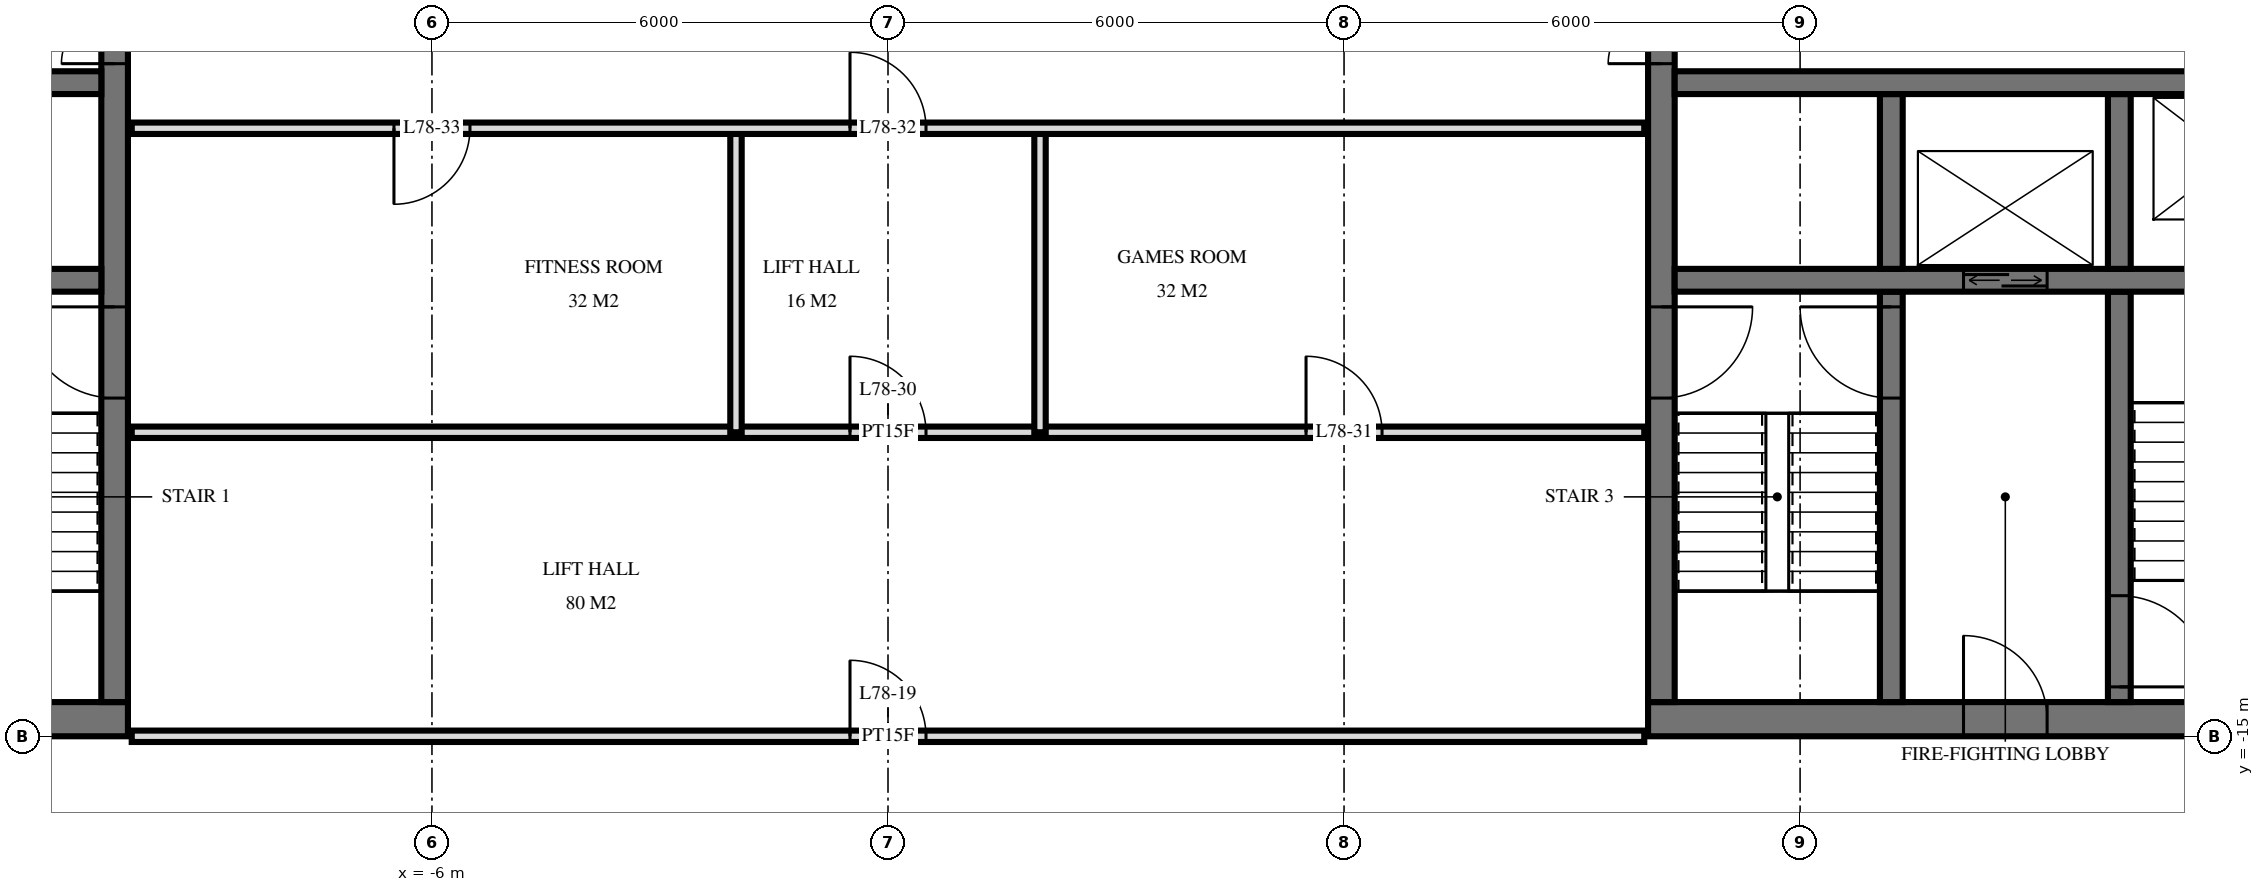
"""IFC4 building model, lengths in metres.
Left out: names, types, materials, properties, quantities, classifications, styles, units other than length and angle.
Written with IfcOpenShell. Run it as: python <this file> out.ifc"""

import sys

from ifc_helpers import new_model, si_unit, direction, frame, frame_2d, origin, place, context, subcontext, project, spatial, rectangle, extrude, element, fill, save


model = new_model("IFC4")
c1 = context("Model", 3, precision=1e-05, world=origin(), true_north=direction((0.0, 1.0)))
c2 = subcontext(c1, "Body", "Model", "MODEL_VIEW")
j1 = project(units=[si_unit("LENGTHUNIT", "METRE"), si_unit("PLANEANGLEUNIT", "RADIAN")], contexts=[c1])
p1 = place(None, origin())
s1 = spatial("IfcSite", under=j1, at=p1, CompositionType="ELEMENT")
p2 = place(p1, origin())
s2 = spatial("IfcBuilding", under=s1, at=p2, CompositionType="ELEMENT")
p3 = place(p2, frame((0.0, 0.0, 294.6)))
s3 = spatial("IfcBuildingStorey", under=s2, at=p3, CompositionType="ELEMENT", Elevation=294.6)
p4 = place(p3, frame((-19.5, -14.775, 0.0), z_axis=(0.0, 0.0, 1.0), x_axis=(1.0, 0.0, 0.0)))
e1 = element("IfcWall", 1, at=p4, inside=s3, PredefinedType="SHEAR", context=c2, shape_type="SweptSolid", body=[
    extrude(rectangle(XDim=9.5, YDim=0.45, at=frame_2d((4.75, 0.0))), origin(), (0.0, 0.0, 1.0), 3.5),
])
p5 = place(p4, frame((1.2, 0.0, 0.0)))
e2 = element("IfcOpeningElement", 2, at=p5, cuts=e1, PredefinedType="OPENING", context=c2, shape_type="SweptSolid", body=[
    extrude(rectangle(XDim=1.2, YDim=2.1, at=frame_2d((0.6, 1.05))), frame((0.0, 0.235, 0.0), z_axis=(0.0, -1.0, 0.0), x_axis=(1.0, 0.0, 0.0)), (0.0, 0.0, 1.0), 0.47),
])
p6 = place(p4, frame((4.25, 0.0, 0.0)))
e3 = element("IfcOpeningElement", 3, at=p6, cuts=e1, PredefinedType="OPENING", context=c2, shape_type="SweptSolid", body=[
    extrude(rectangle(XDim=1.1, YDim=2.1, at=frame_2d((0.55, 1.05))), frame((0.0, 0.235, 0.0), z_axis=(0.0, -1.0, 0.0), x_axis=(1.0, 0.0, 0.0)), (0.0, 0.0, 1.0), 0.47),
])
p7 = place(p3, frame((-10.175, -14.55, 0.0), z_axis=(0.0, 0.0, 1.0), x_axis=(0.0, 1.0, 0.0)))
e4 = element("IfcWall", 4, at=p7, inside=s3, PredefinedType="SHEAR", context=c2, shape_type="SweptSolid", body=[
    extrude(rectangle(XDim=14.1, YDim=0.35, at=frame_2d((7.05, 0.0))), origin(), (0.0, 0.0, 1.0), 3.5),
])
p8 = place(p7, frame((8.4, 0.0, 0.0)))
e5 = element("IfcOpeningElement", 5, at=p8, cuts=e4, PredefinedType="OPENING", context=c2, shape_type="SweptSolid", body=[
    extrude(rectangle(XDim=1.4, YDim=2.4, at=frame_2d((0.7, 1.2))), frame((0.0, 0.185, 0.0), z_axis=(0.0, -1.0, 0.0), x_axis=(1.0, 0.0, 0.0)), (0.0, 0.0, 1.0), 0.37),
])
p9 = place(p7, frame((10.0, 0.0, 0.0)))
e6 = element("IfcOpeningElement", 6, at=p9, cuts=e4, PredefinedType="OPENING", context=c2, shape_type="SweptSolid", body=[
    extrude(rectangle(XDim=1.4, YDim=2.4, at=frame_2d((0.7, 1.2))), frame((0.0, 0.185, 0.0), z_axis=(0.0, -1.0, 0.0), x_axis=(1.0, 0.0, 0.0)), (0.0, 0.0, 1.0), 0.37),
])
p10 = place(p7, frame((4.0, 0.0, 0.0)))
e7 = element("IfcOpeningElement", 7, at=p10, cuts=e4, PredefinedType="OPENING", context=c2, shape_type="SweptSolid", body=[
    extrude(rectangle(XDim=1.2, YDim=2.1, at=frame_2d((0.6, 1.05))), frame((0.0, 0.185, 0.0), z_axis=(0.0, -1.0, 0.0), x_axis=(1.0, 0.0, 0.0)), (0.0, 0.0, 1.0), 0.37),
])
p11 = place(p3, frame((-19.05, -6.4, 0.0), z_axis=(0.0, 0.0, 1.0), x_axis=(1.0, 0.0, 0.0)))
e8 = element("IfcWall", 8, at=p11, inside=s3, PredefinedType="SHEAR", context=c2, shape_type="SweptSolid", body=[
    extrude(rectangle(XDim=8.7, YDim=0.3, at=frame_2d((4.35, 0.0))), origin(), (0.0, 0.0, 1.0), 3.5),
])
p12 = place(p11, frame((0.8, 0.0, 0.0)))
e9 = element("IfcOpeningElement", 9, at=p12, cuts=e8, PredefinedType="OPENING", context=c2, shape_type="SweptSolid", body=[
    extrude(rectangle(XDim=1.1, YDim=2.1, at=frame_2d((0.55, 1.05))), frame((0.0, 0.16, 0.0), z_axis=(0.0, -1.0, 0.0), x_axis=(1.0, 0.0, 0.0)), (0.0, 0.0, 1.0), 0.32),
])
p13 = place(p3, frame((-19.05, -9.0, 0.0), z_axis=(0.0, 0.0, 1.0), x_axis=(1.0, 0.0, 0.0)))
e10 = element("IfcWall", 10, at=p13, inside=s3, PredefinedType="SHEAR", context=c2, shape_type="SweptSolid", body=[
    extrude(rectangle(XDim=8.7, YDim=0.3, at=frame_2d((4.35, 0.0))), origin(), (0.0, 0.0, 1.0), 3.5),
])
p14 = place(p13, frame((3.8, 0.0, 0.0)))
e11 = element("IfcOpeningElement", 11, at=p14, cuts=e10, PredefinedType="OPENING", context=c2, shape_type="SweptSolid", body=[
    extrude(rectangle(XDim=1.1, YDim=2.1, at=frame_2d((0.55, 1.05))), frame((0.0, 0.16, 0.0), z_axis=(0.0, -1.0, 0.0), x_axis=(1.0, 0.0, 0.0)), (0.0, 0.0, 1.0), 0.32),
])
p15 = place(p3, frame((10.0, -14.775, 0.0), z_axis=(0.0, 0.0, 1.0), x_axis=(1.0, 0.0, 0.0)))
e12 = element("IfcWall", 12, at=p15, inside=s3, PredefinedType="SHEAR", context=c2, shape_type="SweptSolid", body=[
    extrude(rectangle(XDim=9.5, YDim=0.45, at=frame_2d((4.75, 0.0))), origin(), (0.0, 0.0, 1.0), 3.5),
])
p16 = place(p15, frame((7.1, 0.0, 0.0)))
e13 = element("IfcOpeningElement", 13, at=p16, cuts=e12, PredefinedType="OPENING", context=c2, shape_type="SweptSolid", body=[
    extrude(rectangle(XDim=1.2, YDim=2.1, at=frame_2d((0.6, 1.05))), frame((0.0, 0.235, 0.0), z_axis=(0.0, -1.0, 0.0), x_axis=(1.0, 0.0, 0.0)), (0.0, 0.0, 1.0), 0.47),
])
p17 = place(p15, frame((4.15, 0.0, 0.0)))
e14 = element("IfcOpeningElement", 14, at=p17, cuts=e12, PredefinedType="OPENING", context=c2, shape_type="SweptSolid", body=[
    extrude(rectangle(XDim=1.1, YDim=2.1, at=frame_2d((0.55, 1.05))), frame((0.0, 0.235, 0.0), z_axis=(0.0, -1.0, 0.0), x_axis=(1.0, 0.0, 0.0)), (0.0, 0.0, 1.0), 0.47),
])
p18 = place(p3, frame((10.175, -14.55, 0.0), z_axis=(0.0, 0.0, 1.0), x_axis=(0.0, 1.0, 0.0)))
e15 = element("IfcWall", 15, at=p18, inside=s3, PredefinedType="SHEAR", context=c2, shape_type="SweptSolid", body=[
    extrude(rectangle(XDim=14.1, YDim=0.35, at=frame_2d((7.05, 0.0))), origin(), (0.0, 0.0, 1.0), 3.5),
])
p19 = place(p18, frame((8.4, 0.0, 0.0)))
e16 = element("IfcOpeningElement", 16, at=p19, cuts=e15, PredefinedType="OPENING", context=c2, shape_type="SweptSolid", body=[
    extrude(rectangle(XDim=1.4, YDim=2.4, at=frame_2d((0.7, 1.2))), frame((0.0, 0.185, 0.0), z_axis=(0.0, -1.0, 0.0), x_axis=(1.0, 0.0, 0.0)), (0.0, 0.0, 1.0), 0.37),
])
p20 = place(p18, frame((10.0, 0.0, 0.0)))
e17 = element("IfcOpeningElement", 17, at=p20, cuts=e15, PredefinedType="OPENING", context=c2, shape_type="SweptSolid", body=[
    extrude(rectangle(XDim=1.4, YDim=2.4, at=frame_2d((0.7, 1.2))), frame((0.0, 0.185, 0.0), z_axis=(0.0, -1.0, 0.0), x_axis=(1.0, 0.0, 0.0)), (0.0, 0.0, 1.0), 0.37),
])
p21 = place(p18, frame((4.0, 0.0, 0.0)))
e18 = element("IfcOpeningElement", 18, at=p21, cuts=e15, PredefinedType="OPENING", context=c2, shape_type="SweptSolid", body=[
    extrude(rectangle(XDim=1.2, YDim=2.1, at=frame_2d((0.6, 1.05))), frame((0.0, 0.185, 0.0), z_axis=(0.0, -1.0, 0.0), x_axis=(1.0, 0.0, 0.0)), (0.0, 0.0, 1.0), 0.37),
])
p22 = place(p3, frame((10.35, -6.4, 0.0), z_axis=(0.0, 0.0, 1.0), x_axis=(1.0, 0.0, 0.0)))
e19 = element("IfcWall", 19, at=p22, inside=s3, PredefinedType="SHEAR", context=c2, shape_type="SweptSolid", body=[
    extrude(rectangle(XDim=8.7, YDim=0.3, at=frame_2d((4.35, 0.0))), origin(), (0.0, 0.0, 1.0), 3.5),
])
p23 = place(p22, frame((6.8, 0.0, 0.0)))
e20 = element("IfcOpeningElement", 20, at=p23, cuts=e19, PredefinedType="OPENING", context=c2, shape_type="SweptSolid", body=[
    extrude(rectangle(XDim=1.1, YDim=2.1, at=frame_2d((0.55, 1.05))), frame((0.0, 0.16, 0.0), z_axis=(0.0, -1.0, 0.0), x_axis=(1.0, 0.0, 0.0)), (0.0, 0.0, 1.0), 0.32),
])
p24 = place(p3, frame((10.35, -9.0, 0.0), z_axis=(0.0, 0.0, 1.0), x_axis=(1.0, 0.0, 0.0)))
e21 = element("IfcWall", 21, at=p24, inside=s3, PredefinedType="SHEAR", context=c2, shape_type="SweptSolid", body=[
    extrude(rectangle(XDim=8.7, YDim=0.3, at=frame_2d((4.35, 0.0))), origin(), (0.0, 0.0, 1.0), 3.5),
])
p25 = place(p24, frame((3.8, 0.0, 0.0)))
e22 = element("IfcOpeningElement", 22, at=p25, cuts=e21, PredefinedType="OPENING", context=c2, shape_type="SweptSolid", body=[
    extrude(rectangle(XDim=1.1, YDim=2.1, at=frame_2d((0.55, 1.05))), frame((0.0, 0.16, 0.0), z_axis=(0.0, -1.0, 0.0), x_axis=(1.0, 0.0, 0.0)), (0.0, 0.0, 1.0), 0.32),
])
p26 = place(p3, frame((13.2, -8.85, 0.0), z_axis=(0.0, 0.0, 1.0), x_axis=(0.0, 1.0, 0.0)))
e23 = element("IfcWall", 23, at=p26, inside=s3, PredefinedType="SHEAR", context=c2, shape_type="SweptSolid", body=[
    extrude(rectangle(XDim=2.3, YDim=0.3, at=frame_2d((1.15, 0.0))), origin(), (0.0, 0.0, 1.0), 3.5),
])
p27 = place(p3, frame((13.2, -14.55, 0.0), z_axis=(0.0, 0.0, 1.0), x_axis=(0.0, 1.0, 0.0)))
e24 = element("IfcWall", 24, at=p27, inside=s3, PredefinedType="SHEAR", context=c2, shape_type="SweptSolid", body=[
    extrude(rectangle(XDim=5.4, YDim=0.3, at=frame_2d((2.7, 0.0))), origin(), (0.0, 0.0, 1.0), 3.5),
])
p28 = place(p27, frame((4.0, 0.0, 0.0)))
e25 = element("IfcOpeningElement", 25, at=p28, cuts=e24, PredefinedType="OPENING", context=c2, shape_type="SweptSolid", body=[
    extrude(rectangle(XDim=1.2, YDim=2.1, at=frame_2d((0.6, 1.05))), frame((0.0, 0.16, 0.0), z_axis=(0.0, -1.0, 0.0), x_axis=(1.0, 0.0, 0.0)), (0.0, 0.0, 1.0), 0.32),
])
p29 = place(p3, frame((16.2, -8.85, 0.0), z_axis=(0.0, 0.0, 1.0), x_axis=(0.0, 1.0, 0.0)))
e26 = element("IfcWall", 26, at=p29, inside=s3, PredefinedType="SHEAR", context=c2, shape_type="SweptSolid", body=[
    extrude(rectangle(XDim=2.3, YDim=0.3, at=frame_2d((1.15, 0.0))), origin(), (0.0, 0.0, 1.0), 3.5),
])
p30 = place(p3, frame((16.2, -14.55, 0.0), z_axis=(0.0, 0.0, 1.0), x_axis=(0.0, 1.0, 0.0)))
e27 = element("IfcWall", 27, at=p30, inside=s3, PredefinedType="SHEAR", context=c2, shape_type="SweptSolid", body=[
    extrude(rectangle(XDim=5.4, YDim=0.3, at=frame_2d((2.7, 0.0))), origin(), (0.0, 0.0, 1.0), 3.5),
])
p31 = place(p30, frame((0.2, 0.0, 0.0)))
e28 = element("IfcOpeningElement", 28, at=p31, cuts=e27, PredefinedType="OPENING", context=c2, shape_type="SweptSolid", body=[
    extrude(rectangle(XDim=1.2, YDim=2.1, at=frame_2d((0.6, 1.05))), frame((0.0, 0.16, 0.0), z_axis=(0.0, -1.0, 0.0), x_axis=(1.0, 0.0, 0.0)), (0.0, 0.0, 1.0), 0.32),
])
for number, where, z_axis, x_axis in (
    (29, (2.0, -11.0, 0.0), (0.0, 0.0, 1.0), (0.0, 1.0, 0.0)),
    (30, (-2.0, -11.0, 0.0), (0.0, 0.0, 1.0), (0.0, 1.0, 0.0)),
):
    element("IfcWall", number, at=place(p3, frame(where, z_axis=z_axis, x_axis=x_axis)), inside=s3, PredefinedType="PARTITIONING", context=c2, shape_type="SweptSolid", body=[
        extrude(rectangle(XDim=4.0, YDim=0.15, at=frame_2d((2.0, 0.0))), origin(), (0.0, 0.0, 1.0), 3.22),
    ])
p32 = place(p3, frame((-9.95, -15.0, 0.0), z_axis=(0.0, 0.0, 1.0), x_axis=(1.0, 0.0, 0.0)))
e31 = element("IfcWall", 31, at=p32, inside=s3, PredefinedType="PARTITIONING", context=c2, shape_type="SweptSolid", body=[
    extrude(rectangle(XDim=19.9, YDim=0.15, at=frame_2d((9.95, 0.0))), origin(), (0.0, 0.0, 1.0), 2.584),
])
p33 = place(p32, frame((9.45, 0.0, 0.0)))
e32 = element("IfcOpeningElement", 32, at=p33, cuts=e31, PredefinedType="OPENING", context=c2, shape_type="SweptSolid", body=[
    extrude(rectangle(XDim=1.0, YDim=2.1, at=frame_2d((0.5, 1.05))), frame((0.0, 0.085, 0.0), z_axis=(0.0, -1.0, 0.0), x_axis=(1.0, 0.0, 0.0)), (0.0, 0.0, 1.0), 0.17),
])
p34 = place(p3, frame((-9.95, -11.0, 0.0), z_axis=(0.0, 0.0, 1.0), x_axis=(1.0, 0.0, 0.0)))
e33 = element("IfcWall", 33, at=p34, inside=s3, PredefinedType="PARTITIONING", context=c2, shape_type="SweptSolid", body=[
    extrude(rectangle(XDim=19.9, YDim=0.15, at=frame_2d((9.95, 0.0))), origin(), (0.0, 0.0, 1.0), 3.22),
])
p35 = place(p34, frame((9.45, 0.0, 0.0)))
e34 = element("IfcOpeningElement", 34, at=p35, cuts=e33, PredefinedType="OPENING", context=c2, shape_type="SweptSolid", body=[
    extrude(rectangle(XDim=1.0, YDim=2.1, at=frame_2d((0.5, 1.05))), frame((0.0, 0.085, 0.0), z_axis=(0.0, -1.0, 0.0), x_axis=(1.0, 0.0, 0.0)), (0.0, 0.0, 1.0), 0.17),
])
p36 = place(p34, frame((15.45, 0.0, 0.0)))
e35 = element("IfcOpeningElement", 35, at=p36, cuts=e33, PredefinedType="OPENING", context=c2, shape_type="SweptSolid", body=[
    extrude(rectangle(XDim=1.0, YDim=2.1, at=frame_2d((0.5, 1.05))), frame((0.0, 0.085, 0.0), z_axis=(0.0, -1.0, 0.0), x_axis=(1.0, 0.0, 0.0)), (0.0, 0.0, 1.0), 0.17),
])
p37 = place(p3, frame((-9.95, -7.0, 0.0), z_axis=(0.0, 0.0, 1.0), x_axis=(1.0, 0.0, 0.0)))
e36 = element("IfcWall", 36, at=p37, inside=s3, PredefinedType="PARTITIONING", context=c2, shape_type="SweptSolid", body=[
    extrude(rectangle(XDim=19.9, YDim=0.15, at=frame_2d((9.95, 0.0))), origin(), (0.0, 0.0, 1.0), 3.22),
])
p38 = place(p37, frame((9.45, 0.0, 0.0)))
e37 = element("IfcOpeningElement", 37, at=p38, cuts=e36, PredefinedType="OPENING", context=c2, shape_type="SweptSolid", body=[
    extrude(rectangle(XDim=1.0, YDim=2.1, at=frame_2d((0.5, 1.05))), frame((0.0, 0.085, 0.0), z_axis=(0.0, -1.0, 0.0), x_axis=(1.0, 0.0, 0.0)), (0.0, 0.0, 1.0), 0.17),
])
p39 = place(p37, frame((3.45, 0.0, 0.0)))
e38 = element("IfcOpeningElement", 38, at=p39, cuts=e36, PredefinedType="OPENING", context=c2, shape_type="SweptSolid", body=[
    extrude(rectangle(XDim=1.0, YDim=2.1, at=frame_2d((0.5, 1.05))), frame((0.0, 0.085, 0.0), z_axis=(0.0, -1.0, 0.0), x_axis=(1.0, 0.0, 0.0)), (0.0, 0.0, 1.0), 0.17),
])
p40 = place(p25, origin())
e39 = element("IfcDoor", 39, at=p40, inside=s3, OperationType="DOUBLE_DOOR_SLIDING", PredefinedType="USERDEFINED", context=c2, shape_type="SweptSolid", body=[
    extrude(rectangle(XDim=1.1, YDim=2.1, at=frame_2d((0.55, 1.05))), frame((0.0, 0.025, 0.0), z_axis=(0.0, -1.0, 0.0), x_axis=(1.0, 0.0, 0.0)), (0.0, 0.0, 1.0), 0.05),
])
fill(e22, e39)
p41 = place(p8, origin())
e40 = element("IfcDoor", 40, at=p41, inside=s3, OperationType="DOUBLE_DOOR_SINGLE_SWING", PredefinedType="DOOR", context=c2, shape_type="SweptSolid", body=[
    extrude(rectangle(XDim=1.4, YDim=2.4, at=frame_2d((0.7, 1.2))), frame((0.0, 0.025, 0.0), z_axis=(0.0, -1.0, 0.0), x_axis=(1.0, 0.0, 0.0)), (0.0, 0.0, 1.0), 0.05),
])
fill(e5, e40)
p42 = place(p10, origin())
e41 = element("IfcDoor", 41, at=p42, inside=s3, OperationType="SINGLE_SWING_LEFT", PredefinedType="DOOR", context=c2, shape_type="SweptSolid", body=[
    extrude(rectangle(XDim=1.2, YDim=2.1, at=frame_2d((0.6, 1.05))), frame((0.0, 0.025, 0.0), z_axis=(0.0, -1.0, 0.0), x_axis=(1.0, 0.0, 0.0)), (0.0, 0.0, 1.0), 0.05),
])
fill(e7, e41)
p43 = place(p19, origin())
e42 = element("IfcDoor", 42, at=p43, inside=s3, OperationType="DOUBLE_DOOR_SINGLE_SWING", PredefinedType="DOOR", context=c2, shape_type="SweptSolid", body=[
    extrude(rectangle(XDim=1.4, YDim=2.4, at=frame_2d((0.7, 1.2))), frame((0.0, 0.025, 0.0), z_axis=(0.0, -1.0, 0.0), x_axis=(1.0, 0.0, 0.0)), (0.0, 0.0, 1.0), 0.05),
])
fill(e16, e42)
p44 = place(p21, frame((0.6, 0.0, 0.0), z_axis=(0.0, 0.0, 1.0), x_axis=(-1.0, 0.0, 0.0)))
e43 = element("IfcDoor", 43, at=p44, inside=s3, OperationType="SINGLE_SWING_RIGHT", PredefinedType="DOOR", context=c2, shape_type="SweptSolid", body=[
    extrude(rectangle(XDim=1.2, YDim=2.1, at=frame_2d((0.0, 1.05))), frame((0.0, -0.025, 0.0), z_axis=(0.0, 1.0, 0.0), x_axis=(-1.0, 0.0, 0.0)), (0.0, 0.0, 1.0), 0.05),
])
fill(e18, e43)
p45 = place(p17, origin())
e44 = element("IfcDoor", 44, at=p45, inside=s3, OperationType="SINGLE_SWING_RIGHT", PredefinedType="DOOR", context=c2, shape_type="SweptSolid", body=[
    extrude(rectangle(XDim=1.1, YDim=2.1, at=frame_2d((0.55, 1.05))), frame((0.0, 0.025, 0.0), z_axis=(0.0, -1.0, 0.0), x_axis=(1.0, 0.0, 0.0)), (0.0, 0.0, 1.0), 0.05),
])
fill(e14, e44)
p46 = place(p28, origin())
e45 = element("IfcDoor", 45, at=p46, inside=s3, OperationType="SINGLE_SWING_LEFT", PredefinedType="DOOR", context=c2, shape_type="SweptSolid", body=[
    extrude(rectangle(XDim=1.2, YDim=2.1, at=frame_2d((0.6, 1.05))), frame((0.0, 0.025, 0.0), z_axis=(0.0, -1.0, 0.0), x_axis=(1.0, 0.0, 0.0)), (0.0, 0.0, 1.0), 0.05),
])
fill(e25, e45)
p47 = place(p31, frame((0.6, 0.0, 0.0), z_axis=(0.0, 0.0, 1.0), x_axis=(-1.0, 0.0, 0.0)))
e46 = element("IfcDoor", 46, at=p47, inside=s3, OperationType="SINGLE_SWING_LEFT", PredefinedType="DOOR", context=c2, shape_type="SweptSolid", body=[
    extrude(rectangle(XDim=1.2, YDim=2.1, at=frame_2d((0.0, 1.05))), frame((0.0, -0.025, 0.0), z_axis=(0.0, 1.0, 0.0), x_axis=(-1.0, 0.0, 0.0)), (0.0, 0.0, 1.0), 0.05),
])
fill(e28, e46)
p48 = place(p33, origin())
e47 = element("IfcDoor", 47, at=p48, inside=s3, OperationType="SINGLE_SWING_RIGHT", PredefinedType="DOOR", context=c2, shape_type="SweptSolid", body=[
    extrude(rectangle(XDim=1.0, YDim=2.1, at=frame_2d((0.5, 1.05))), frame((0.0, 0.025, 0.0), z_axis=(0.0, -1.0, 0.0), x_axis=(1.0, 0.0, 0.0)), (0.0, 0.0, 1.0), 0.05),
])
fill(e32, e47)
p49 = place(p35, origin())
e48 = element("IfcDoor", 48, at=p49, inside=s3, OperationType="SINGLE_SWING_RIGHT", PredefinedType="DOOR", context=c2, shape_type="SweptSolid", body=[
    extrude(rectangle(XDim=1.0, YDim=2.1, at=frame_2d((0.5, 1.05))), frame((0.0, 0.025, 0.0), z_axis=(0.0, -1.0, 0.0), x_axis=(1.0, 0.0, 0.0)), (0.0, 0.0, 1.0), 0.05),
])
fill(e34, e48)
p50 = place(p36, origin())
e49 = element("IfcDoor", 49, at=p50, inside=s3, OperationType="SINGLE_SWING_RIGHT", PredefinedType="DOOR", context=c2, shape_type="SweptSolid", body=[
    extrude(rectangle(XDim=1.0, YDim=2.1, at=frame_2d((0.5, 1.05))), frame((0.0, 0.025, 0.0), z_axis=(0.0, -1.0, 0.0), x_axis=(1.0, 0.0, 0.0)), (0.0, 0.0, 1.0), 0.05),
])
fill(e35, e49)
p51 = place(p38, origin())
e50 = element("IfcDoor", 50, at=p51, inside=s3, OperationType="SINGLE_SWING_RIGHT", PredefinedType="DOOR", context=c2, shape_type="SweptSolid", body=[
    extrude(rectangle(XDim=1.0, YDim=2.1, at=frame_2d((0.5, 1.05))), frame((0.0, 0.025, 0.0), z_axis=(0.0, -1.0, 0.0), x_axis=(1.0, 0.0, 0.0)), (0.0, 0.0, 1.0), 0.05),
])
fill(e37, e50)
p52 = place(p39, frame((0.5, 0.0, 0.0), z_axis=(0.0, 0.0, 1.0), x_axis=(-1.0, 0.0, 0.0)))
e51 = element("IfcDoor", 51, at=p52, inside=s3, OperationType="SINGLE_SWING_LEFT", PredefinedType="DOOR", context=c2, shape_type="SweptSolid", body=[
    extrude(rectangle(XDim=1.0, YDim=2.1, at=frame_2d((0.0, 1.05))), frame((0.0, -0.025, 0.0), z_axis=(0.0, 1.0, 0.0), x_axis=(-1.0, 0.0, 0.0)), (0.0, 0.0, 1.0), 0.05),
])
fill(e38, e51)
save(model, sys.argv[1])
